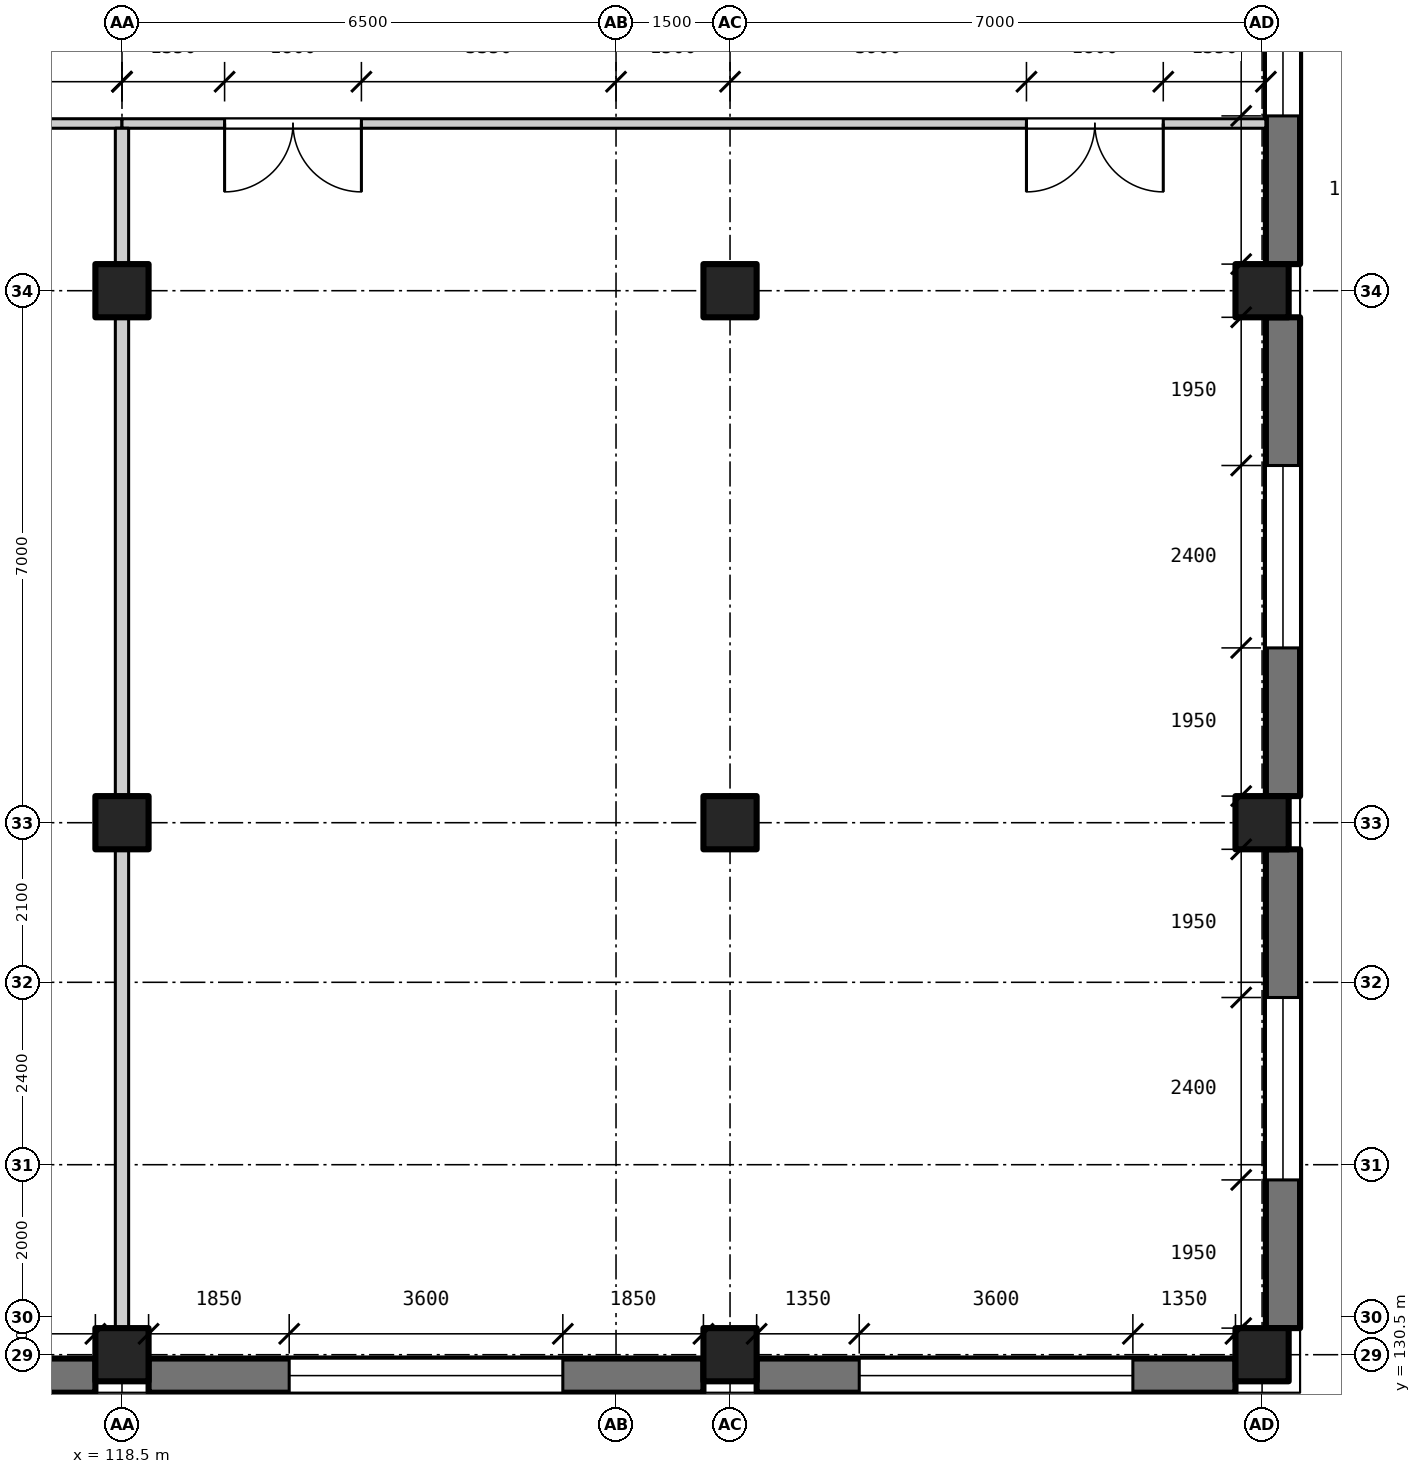
"""IFC4 building model, lengths in metres.
Left out: names, types, materials, properties, quantities, classifications, styles, units other than length and angle.
Written with IfcOpenShell. Run it as: python <this file> out.ifc"""

import sys

from ifc_helpers import new_model, si_unit, direction, frame, frame_2d, origin, origin_2d, place, context, subcontext, project, spatial, rectangle, extrude, element, fill, save


model = new_model("IFC4")
c1 = context("Model", 3, precision=1e-05, world=origin(), true_north=direction((0.0, 1.0)))
c2 = subcontext(c1, "Body", "Model", "MODEL_VIEW")
j1 = project(units=[si_unit("LENGTHUNIT", "METRE"), si_unit("PLANEANGLEUNIT", "RADIAN")], contexts=[c1])
p1 = place(None, origin())
s1 = spatial("IfcSite", under=j1, at=p1, CompositionType="ELEMENT")
p2 = place(p1, origin())
s2 = spatial("IfcBuilding", under=s1, at=p2, CompositionType="ELEMENT")
p3 = place(p2, origin())
s3 = spatial("IfcBuildingStorey", under=s2, at=p3, CompositionType="ELEMENT", Elevation=0.0)
for number, where, z_axis, x_axis in (
    (1, (118.5, 130.5, -1.4), (0.0, 0.0, 1.0), (1.0, 0.0, 0.0)),
    (2, (118.5, 137.5, -1.4), (0.0, 0.0, 1.0), (1.0, 0.0, 0.0)),
    (3, (118.5, 144.5, -1.4), (0.0, 0.0, 1.0), (1.0, 0.0, 0.0)),
    (4, (126.5, 130.5, -1.4), (0.0, 0.0, 1.0), (1.0, 0.0, 0.0)),
    (5, (126.5, 137.5, -1.4), (0.0, 0.0, 1.0), (1.0, 0.0, 0.0)),
    (6, (126.5, 144.5, -1.4), (0.0, 0.0, 1.0), (1.0, 0.0, 0.0)),
    (7, (133.5, 130.5, -1.4), (0.0, 0.0, 1.0), (1.0, 0.0, 0.0)),
    (8, (133.5, 137.5, -1.4), (0.0, 0.0, 1.0), (1.0, 0.0, 0.0)),
    (9, (133.5, 144.5, -1.4), (0.0, 0.0, 1.0), (1.0, 0.0, 0.0)),
):
    element("IfcColumn", number, at=place(p3, frame(where, z_axis=z_axis, x_axis=x_axis)), inside=s3, PredefinedType="COLUMN", context=c2, shape_type="SweptSolid", body=[
        extrude(rectangle(XDim=0.7, YDim=0.7, at=origin_2d()), origin(), (0.0, 0.0, 1.0), 7.4),
    ])
p4 = place(p3, frame((118.15, 130.225, 0.0), z_axis=(0.0, 0.0, 1.0), x_axis=(-1.0, 0.0, 0.0)))
e10 = element("IfcWall", 10, at=p4, inside=s3, PredefinedType="SOLIDWALL", context=c2, shape_type="SweptSolid", body=[
    extrude(rectangle(XDim=7.3, YDim=0.45, at=frame_2d((3.65, 0.0))), origin(), (0.0, 0.0, 1.0), 4.9),
])
p5 = place(p4, frame((1.85, 0.0, 0.9)))
e11 = element("IfcOpeningElement", 11, at=p5, cuts=e10, PredefinedType="OPENING", context=c2, shape_type="SweptSolid", body=[
    extrude(rectangle(XDim=3.6, YDim=1.6, at=frame_2d((1.8, 0.8))), frame((0.0, 0.235, 0.0), z_axis=(0.0, -1.0, 0.0), x_axis=(1.0, 0.0, 0.0)), (0.0, 0.0, 1.0), 0.47),
])
p6 = place(p3, frame((126.15, 130.225, 0.0), z_axis=(0.0, 0.0, 1.0), x_axis=(-1.0, 0.0, 0.0)))
e12 = element("IfcWall", 12, at=p6, inside=s3, PredefinedType="SOLIDWALL", context=c2, shape_type="SweptSolid", body=[
    extrude(rectangle(XDim=7.3, YDim=0.45, at=frame_2d((3.65, 0.0))), origin(), (0.0, 0.0, 1.0), 4.9),
])
p7 = place(p6, frame((1.85, 0.0, 0.9)))
e13 = element("IfcOpeningElement", 13, at=p7, cuts=e12, PredefinedType="OPENING", context=c2, shape_type="SweptSolid", body=[
    extrude(rectangle(XDim=3.6, YDim=1.6, at=frame_2d((1.8, 0.8))), frame((0.0, 0.235, 0.0), z_axis=(0.0, -1.0, 0.0), x_axis=(1.0, 0.0, 0.0)), (0.0, 0.0, 1.0), 0.47),
])
p8 = place(p3, frame((133.15, 130.225, 0.0), z_axis=(0.0, 0.0, 1.0), x_axis=(-1.0, 0.0, 0.0)))
e14 = element("IfcWall", 14, at=p8, inside=s3, PredefinedType="SOLIDWALL", context=c2, shape_type="SweptSolid", body=[
    extrude(rectangle(XDim=6.3, YDim=0.45, at=frame_2d((3.15, 0.0))), origin(), (0.0, 0.0, 1.0), 4.9),
])
p9 = place(p8, frame((1.35, 0.0, 0.9)))
e15 = element("IfcOpeningElement", 15, at=p9, cuts=e14, PredefinedType="OPENING", context=c2, shape_type="SweptSolid", body=[
    extrude(rectangle(XDim=3.6, YDim=1.6, at=frame_2d((1.8, 0.8))), frame((0.0, 0.235, 0.0), z_axis=(0.0, -1.0, 0.0), x_axis=(1.0, 0.0, 0.0)), (0.0, 0.0, 1.0), 0.47),
])
p10 = place(p3, frame((133.775, 137.15, 0.0), z_axis=(0.0, 0.0, 1.0), x_axis=(0.0, -1.0, 0.0)))
e16 = element("IfcWall", 16, at=p10, inside=s3, PredefinedType="SOLIDWALL", context=c2, shape_type="SweptSolid", body=[
    extrude(rectangle(XDim=6.3, YDim=0.45, at=frame_2d((3.15, 0.0))), origin(), (0.0, 0.0, 1.0), 5.0),
])
p11 = place(p10, frame((1.95, 0.0, 0.9)))
e17 = element("IfcOpeningElement", 17, at=p11, cuts=e16, PredefinedType="OPENING", context=c2, shape_type="SweptSolid", body=[
    extrude(rectangle(XDim=2.4, YDim=1.6, at=frame_2d((1.2, 0.8))), frame((0.0, 0.235, 0.0), z_axis=(0.0, -1.0, 0.0), x_axis=(1.0, 0.0, 0.0)), (0.0, 0.0, 1.0), 0.47),
])
p12 = place(p3, frame((133.775, 144.15, 0.0), z_axis=(0.0, 0.0, 1.0), x_axis=(0.0, -1.0, 0.0)))
e18 = element("IfcWall", 18, at=p12, inside=s3, PredefinedType="SOLIDWALL", context=c2, shape_type="SweptSolid", body=[
    extrude(rectangle(XDim=6.3, YDim=0.45, at=frame_2d((3.15, 0.0))), origin(), (0.0, 0.0, 1.0), 5.0),
])
p13 = place(p12, frame((1.95, 0.0, 0.9)))
e19 = element("IfcOpeningElement", 19, at=p13, cuts=e18, PredefinedType="OPENING", context=c2, shape_type="SweptSolid", body=[
    extrude(rectangle(XDim=2.4, YDim=1.6, at=frame_2d((1.2, 0.8))), frame((0.0, 0.235, 0.0), z_axis=(0.0, -1.0, 0.0), x_axis=(1.0, 0.0, 0.0)), (0.0, 0.0, 1.0), 0.47),
])
p14 = place(p3, frame((133.775, 151.15, 0.0), z_axis=(0.0, 0.0, 1.0), x_axis=(0.0, -1.0, 0.0)))
e20 = element("IfcWall", 20, at=p14, inside=s3, PredefinedType="SOLIDWALL", context=c2, shape_type="SweptSolid", body=[
    extrude(rectangle(XDim=6.3, YDim=0.45, at=frame_2d((3.15, 0.0))), origin(), (0.0, 0.0, 1.0), 5.0),
])
p15 = place(p14, frame((1.95, 0.0, 0.9)))
e21 = element("IfcOpeningElement", 21, at=p15, cuts=e20, PredefinedType="OPENING", context=c2, shape_type="SweptSolid", body=[
    extrude(rectangle(XDim=2.4, YDim=1.6, at=frame_2d((1.2, 0.8))), frame((0.0, 0.235, 0.0), z_axis=(0.0, -1.0, 0.0), x_axis=(1.0, 0.0, 0.0)), (0.0, 0.0, 1.0), 0.47),
])
p16 = place(p3, frame((110.5, 146.7, 0.0), z_axis=(0.0, 0.0, 1.0), x_axis=(1.0, 0.0, 0.0)))
e22 = element("IfcWall", 22, at=p16, inside=s3, PredefinedType="PARTITIONING", context=c2, shape_type="SweptSolid", body=[
    extrude(rectangle(XDim=8.0, YDim=0.125, at=frame_2d((4.0, 0.0))), origin(), (0.0, 0.0, 1.0), 5.7),
])
p17 = place(p16, frame((3.5, 0.0, 0.0)))
e23 = element("IfcOpeningElement", 23, at=p17, cuts=e22, PredefinedType="OPENING", context=c2, shape_type="SweptSolid", body=[
    extrude(rectangle(XDim=1.0, YDim=2.1, at=frame_2d((0.5, 1.05))), frame((0.0, 0.073, 0.0), z_axis=(0.0, -1.0, 0.0), x_axis=(1.0, 0.0, 0.0)), (0.0, 0.0, 1.0), 0.145),
])
p18 = place(p3, frame((118.5, 146.7, 0.0), z_axis=(0.0, 0.0, 1.0), x_axis=(1.0, 0.0, 0.0)))
e24 = element("IfcWall", 24, at=p18, inside=s3, PredefinedType="PARTITIONING", context=c2, shape_type="SweptSolid", body=[
    extrude(rectangle(XDim=15.05, YDim=0.125, at=frame_2d((7.525, 0.0))), origin(), (0.0, 0.0, 1.0), 5.7),
])
p19 = place(p18, frame((1.35, 0.0, 0.0)))
e25 = element("IfcOpeningElement", 25, at=p19, cuts=e24, PredefinedType="OPENING", context=c2, shape_type="SweptSolid", body=[
    extrude(rectangle(XDim=1.8, YDim=2.1, at=frame_2d((0.9, 1.05))), frame((0.0, 0.073, 0.0), z_axis=(0.0, -1.0, 0.0), x_axis=(1.0, 0.0, 0.0)), (0.0, 0.0, 1.0), 0.145),
])
p20 = place(p18, frame((11.9, 0.0, 0.0)))
e26 = element("IfcOpeningElement", 26, at=p20, cuts=e24, PredefinedType="OPENING", context=c2, shape_type="SweptSolid", body=[
    extrude(rectangle(XDim=1.8, YDim=2.1, at=frame_2d((0.9, 1.05))), frame((0.0, 0.073, 0.0), z_axis=(0.0, -1.0, 0.0), x_axis=(1.0, 0.0, 0.0)), (0.0, 0.0, 1.0), 0.145),
])
for number, where, z_axis, x_axis in (
    (27, (118.5, 130.85, 0.0), (0.0, 0.0, 1.0), (0.0, 1.0, 0.0)),
    (28, (118.5, 137.85, 0.0), (0.0, 0.0, 1.0), (0.0, 1.0, 0.0)),
):
    element("IfcWall", number, at=place(p3, frame(where, z_axis=z_axis, x_axis=x_axis)), inside=s3, PredefinedType="PARTITIONING", context=c2, shape_type="SweptSolid", body=[
        extrude(rectangle(XDim=6.3, YDim=0.175, at=frame_2d((3.15, 0.0))), origin(), (0.0, 0.0, 1.0), 5.0),
    ])
p21 = place(p3, frame((118.5, 144.85, 0.0), z_axis=(0.0, 0.0, 1.0), x_axis=(0.0, 1.0, 0.0)))
e29 = element("IfcWall", 29, at=p21, inside=s3, PredefinedType="PARTITIONING", context=c2, shape_type="SweptSolid", body=[
    extrude(rectangle(XDim=1.787, YDim=0.175, at=frame_2d((0.894, 0.0))), origin(), (0.0, 0.0, 1.0), 5.0),
])
p22 = place(p7, origin())
e30 = element("IfcWindow", 30, at=p22, inside=s3, PartitioningType="SINGLE_PANEL", PredefinedType="WINDOW", context=c2, shape_type="SweptSolid", body=[
    extrude(rectangle(XDim=3.6, YDim=1.6, at=frame_2d((1.8, 0.8))), frame((0.0, -0.125, 0.0), z_axis=(0.0, -1.0, 0.0), x_axis=(1.0, 0.0, 0.0)), (0.0, 0.0, 1.0), 0.06),
])
fill(e13, e30)
p23 = place(p9, origin())
e31 = element("IfcWindow", 31, at=p23, inside=s3, PartitioningType="SINGLE_PANEL", PredefinedType="WINDOW", context=c2, shape_type="SweptSolid", body=[
    extrude(rectangle(XDim=3.6, YDim=1.6, at=frame_2d((1.8, 0.8))), frame((0.0, -0.125, 0.0), z_axis=(0.0, -1.0, 0.0), x_axis=(1.0, 0.0, 0.0)), (0.0, 0.0, 1.0), 0.06),
])
fill(e15, e31)
p24 = place(p11, origin())
e32 = element("IfcWindow", 32, at=p24, inside=s3, PartitioningType="SINGLE_PANEL", PredefinedType="WINDOW", context=c2, shape_type="SweptSolid", body=[
    extrude(rectangle(XDim=2.4, YDim=1.6, at=frame_2d((1.2, 0.8))), frame((0.0, -0.125, 0.0), z_axis=(0.0, -1.0, 0.0), x_axis=(1.0, 0.0, 0.0)), (0.0, 0.0, 1.0), 0.06),
])
fill(e17, e32)
p25 = place(p13, origin())
e33 = element("IfcWindow", 33, at=p25, inside=s3, PartitioningType="SINGLE_PANEL", PredefinedType="WINDOW", context=c2, shape_type="SweptSolid", body=[
    extrude(rectangle(XDim=2.4, YDim=1.6, at=frame_2d((1.2, 0.8))), frame((0.0, -0.125, 0.0), z_axis=(0.0, -1.0, 0.0), x_axis=(1.0, 0.0, 0.0)), (0.0, 0.0, 1.0), 0.06),
])
fill(e19, e33)
p26 = place(p15, origin())
e34 = element("IfcWindow", 34, at=p26, inside=s3, PartitioningType="SINGLE_PANEL", PredefinedType="WINDOW", context=c2, shape_type="SweptSolid", body=[
    extrude(rectangle(XDim=2.4, YDim=1.6, at=frame_2d((1.2, 0.8))), frame((0.0, -0.125, 0.0), z_axis=(0.0, -1.0, 0.0), x_axis=(1.0, 0.0, 0.0)), (0.0, 0.0, 1.0), 0.06),
])
fill(e21, e34)
p27 = place(p19, frame((1.8, 0.0, 0.0), z_axis=(0.0, 0.0, 1.0), x_axis=(-1.0, 0.0, 0.0)))
e35 = element("IfcDoor", 35, at=p27, inside=s3, OperationType="DOUBLE_DOOR_SINGLE_SWING", PredefinedType="DOOR", context=c2, shape_type="SweptSolid", body=[
    extrude(rectangle(XDim=1.8, YDim=2.1, at=frame_2d((0.9, 1.05))), frame((0.0, 0.025, 0.0), z_axis=(0.0, -1.0, 0.0), x_axis=(1.0, 0.0, 0.0)), (0.0, 0.0, 1.0), 0.05),
])
fill(e25, e35)
p28 = place(p20, frame((1.8, 0.0, 0.0), z_axis=(0.0, 0.0, 1.0), x_axis=(-1.0, 0.0, 0.0)))
e36 = element("IfcDoor", 36, at=p28, inside=s3, OperationType="DOUBLE_DOOR_SINGLE_SWING", PredefinedType="DOOR", context=c2, shape_type="SweptSolid", body=[
    extrude(rectangle(XDim=1.8, YDim=2.1, at=frame_2d((0.9, 1.05))), frame((0.0, 0.025, 0.0), z_axis=(0.0, -1.0, 0.0), x_axis=(1.0, 0.0, 0.0)), (0.0, 0.0, 1.0), 0.05),
])
fill(e26, e36)
save(model, sys.argv[1])
